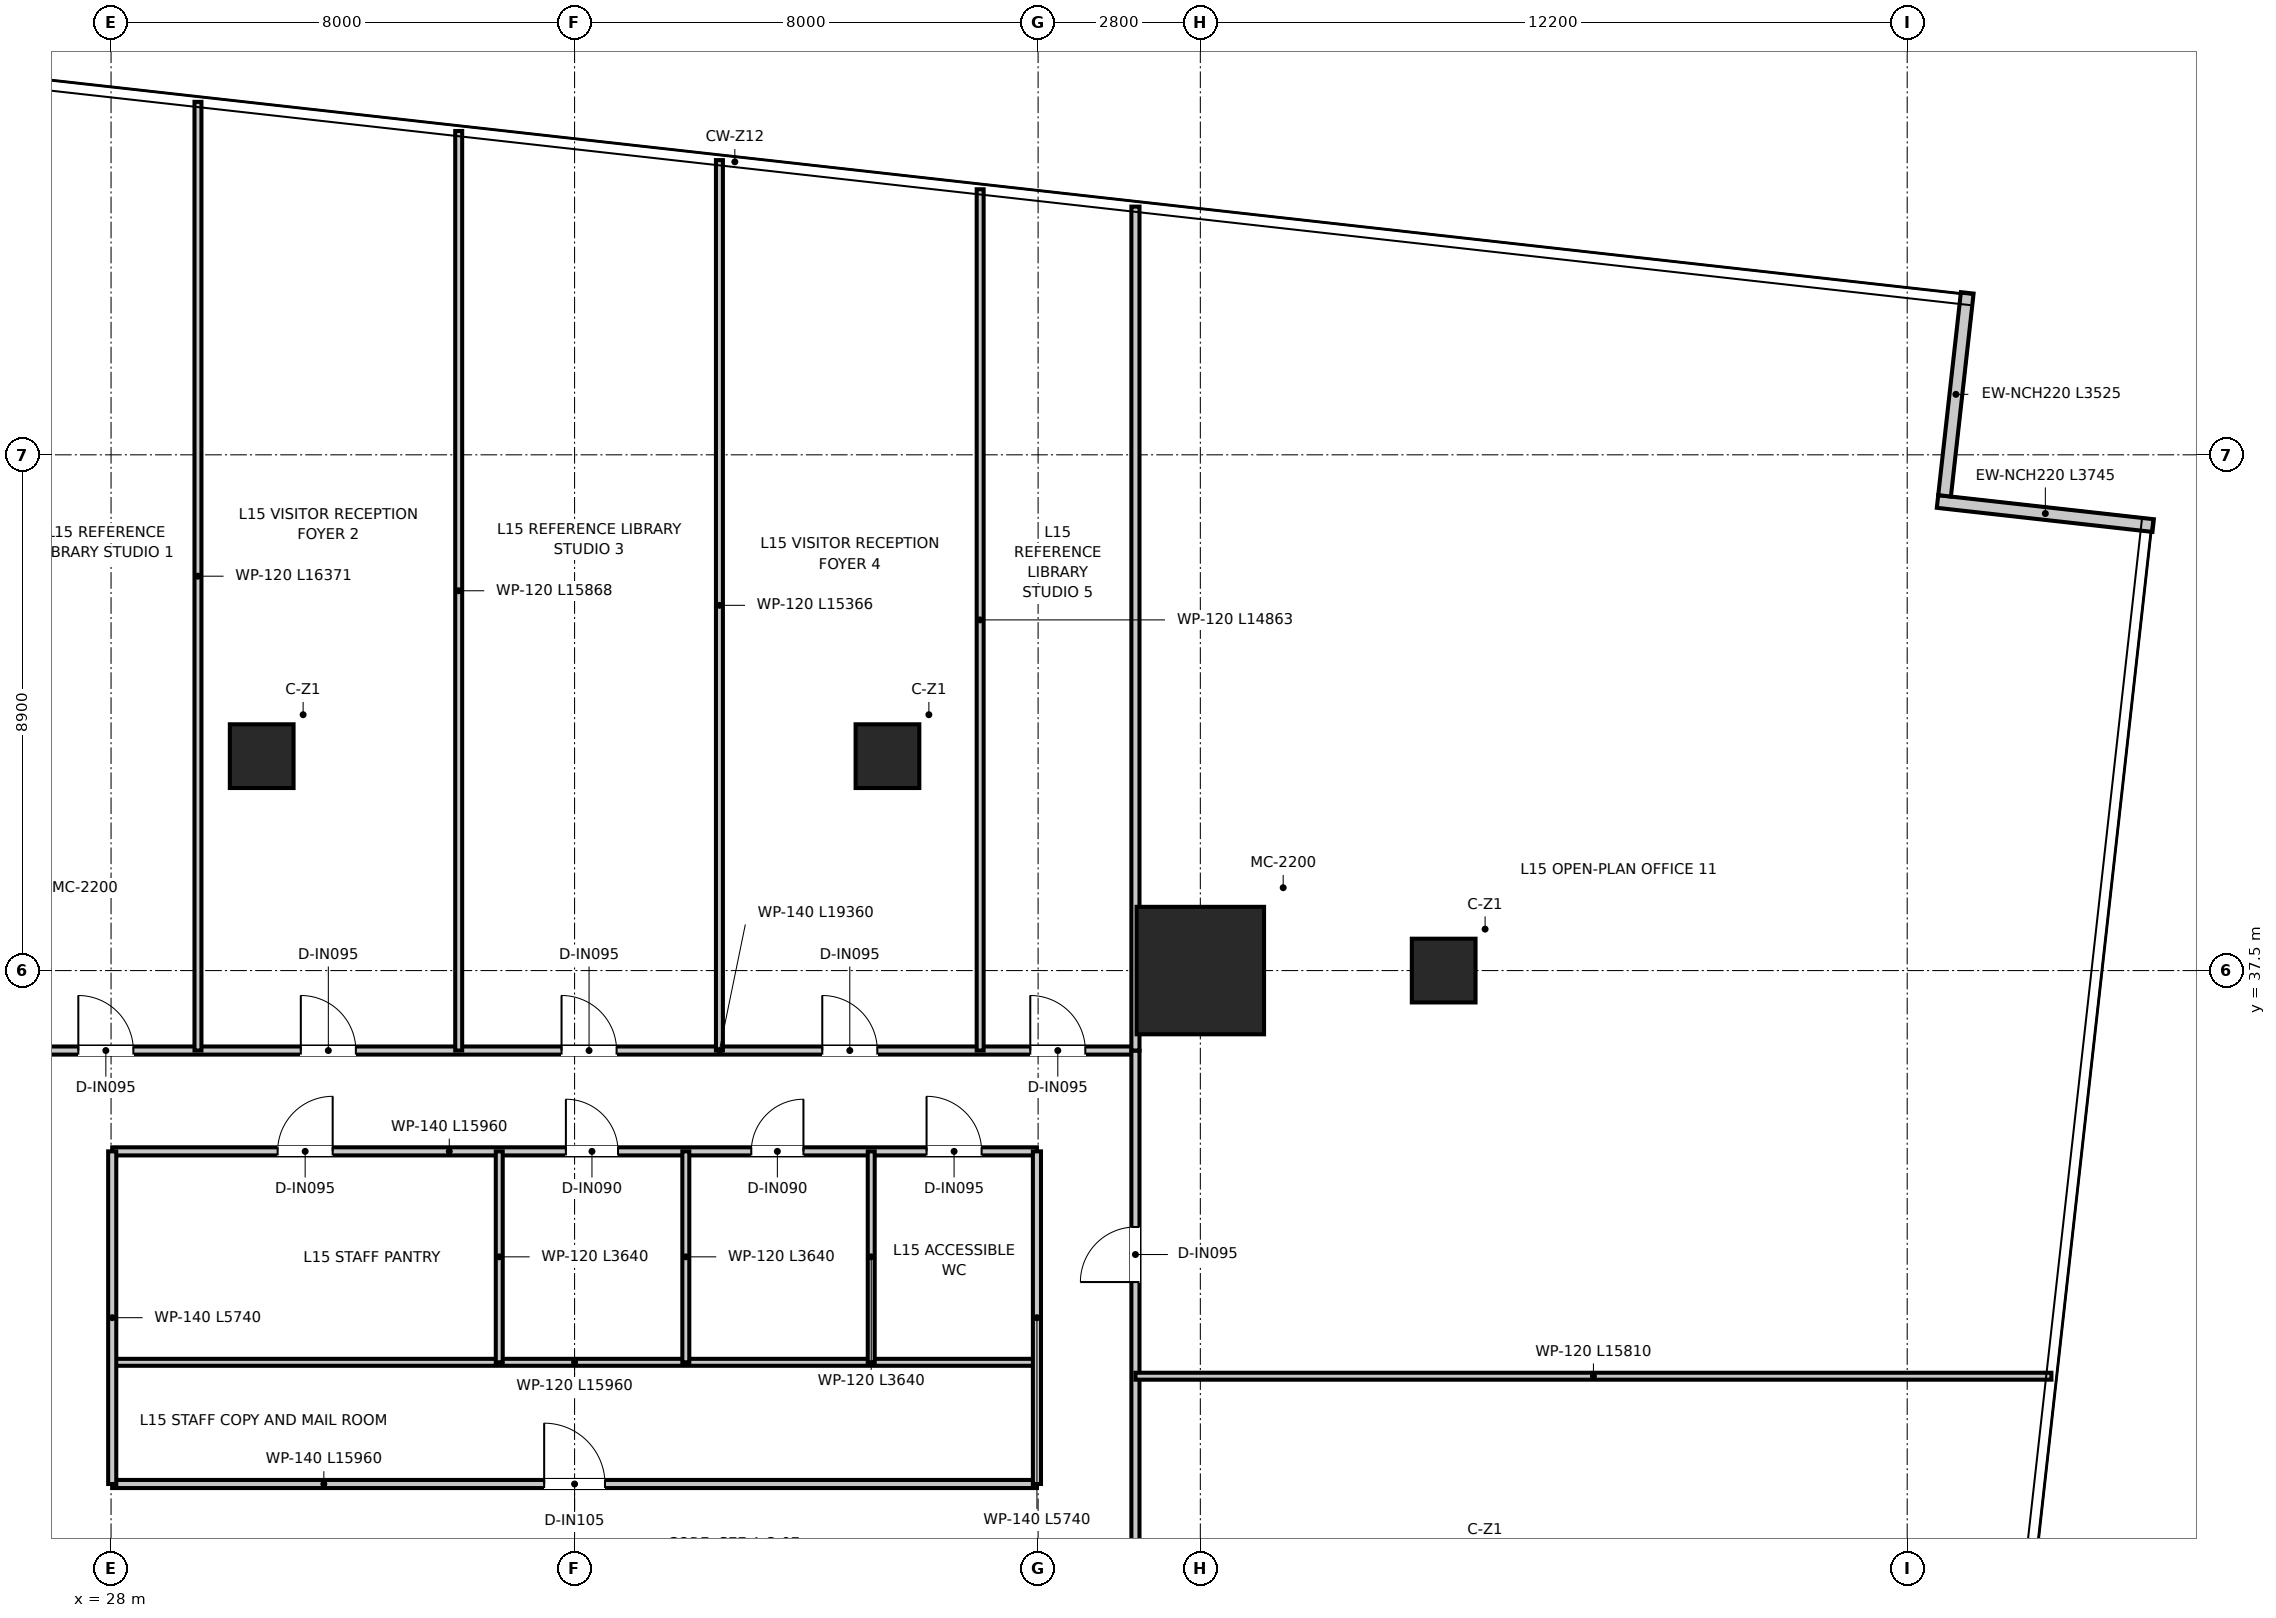
"""IFC4 building model, lengths in metres.
Left out: names, types, materials, properties, quantities, classifications, styles, units other than length and angle.
Written with IfcOpenShell. Run it as: python <this file> out.ifc"""

import sys

from ifc_helpers import new_model, si_unit, direction, frame, frame_2d, origin, origin_2d, place, context, subcontext, project, spatial, rectangle, extrude, source, transform, mapped, element, fill, save


model = new_model("IFC4")
c1 = context("Model", 3, precision=1e-05, world=origin(), true_north=direction((0.0, 1.0)))
c2 = subcontext(c1, "Body", "Model", "MODEL_VIEW")
j1 = project(units=[si_unit("LENGTHUNIT", "METRE"), si_unit("PLANEANGLEUNIT", "RADIAN")], contexts=[c1])
p1 = place(None, origin())
s1 = spatial("IfcSite", under=j1, at=p1, CompositionType="ELEMENT")
p2 = place(p1, origin())
s2 = spatial("IfcBuilding", under=s1, at=p2, CompositionType="ELEMENT")
p3 = place(p2, frame((0.0, 0.0, 64.5)))
s3 = spatial("IfcBuildingStorey", under=s2, at=p3, CompositionType="ELEMENT", Elevation=64.5)
m1 = source(origin(), c2, "Body", "SweptSolid", [
    extrude(rectangle(XDim=2.2, YDim=2.2, at=origin_2d()), origin(), (0.0, 0.0, 1.0), 3.95),
])
p4 = place(p3, frame((46.8, 37.5, 0.0), z_axis=(0.0, 0.0, 1.0), x_axis=(1.0, 0.0, 0.0)))
e1 = element("IfcColumn", 1, at=p4, inside=s3, PredefinedType="USERDEFINED", context=c2, shape_type="MappedRepresentation", body=[
    mapped(m1, transform((0.0, 0.0, 0.0), x_axis=(1.0, 0.0, 0.0), y_axis=(0.0, 1.0, 0.0), z_axis=(0.0, 0.0, 1.0), scale=1.0)),
])
m2 = source(origin(), c2, "Body", "SweptSolid", [
    extrude(rectangle(XDim=1.1, YDim=1.1, at=origin_2d()), origin(), (0.0, 0.0, 1.0), 3.95),
])
for number, where, z_axis, x_axis in (
    (2, (30.6, 41.2, 0.0), (0.0, 0.0, 1.0), (1.0, 0.0, 0.0)),
    (3, (41.4, 41.2, 0.0), (0.0, 0.0, 1.0), (1.0, 0.0, 0.0)),
    (4, (51.0, 37.5, 0.0), (0.0, 0.0, 1.0), (1.0, 0.0, 0.0)),
):
    element("IfcColumn", number, at=place(p3, frame(where, z_axis=z_axis, x_axis=x_axis)), inside=s3, PredefinedType="COLUMN", context=c2, shape_type="MappedRepresentation", body=[
        mapped(m2, transform((0.0, 0.0, 0.0), x_axis=(1.0, 0.0, 0.0), y_axis=(0.0, 1.0, 0.0), z_axis=(0.0, 0.0, 1.0), scale=1.0)),
    ])
p5 = place(p3, frame((63.245, 45.179, 0.0), z_axis=(0.0, 0.0, 1.0), x_axis=(-0.99381117716, 0.111082600583, 0.0)))
e5 = element("IfcWall", 5, at=p5, inside=s3, PredefinedType="ELEMENTEDWALL", context=c2, shape_type="SweptSolid", body=[
    extrude(rectangle(XDim=3.745, YDim=0.22, at=frame_2d((1.873, 0.0))), origin(), (0.0, 0.0, 1.0), 3.67),
])
p6 = place(p3, frame((59.645, 45.692, 0.0), z_axis=(0.0, 0.0, 1.0), x_axis=(0.111016801598, 0.993818529593, 0.0)))
e6 = element("IfcWall", 6, at=p6, inside=s3, PredefinedType="ELEMENTEDWALL", context=c2, shape_type="SweptSolid", body=[
    extrude(rectangle(XDim=3.525, YDim=0.22, at=frame_2d((1.763, 0.0))), origin(), (0.0, 0.0, 1.0), 3.67),
])
p7 = place(p3, frame((28.02, 28.64, 0.0), z_axis=(0.0, 0.0, 1.0), x_axis=(1.0, 0.0, 0.0)))
e7 = element("IfcWall", 7, at=p7, inside=s3, PredefinedType="PARTITIONING", context=c2, shape_type="SweptSolid", body=[
    extrude(rectangle(XDim=15.96, YDim=0.14, at=frame_2d((7.98, 0.0))), origin(), (0.0, 0.0, 1.0), 3.08),
])
p8 = place(p7, frame((7.455, 0.0, 0.0)))
e8 = element("IfcOpeningElement", 8, at=p8, cuts=e7, PredefinedType="OPENING", context=c2, shape_type="SweptSolid", body=[
    extrude(rectangle(XDim=1.05, YDim=2.15, at=frame_2d((0.525, 1.075))), frame((0.0, 0.08, 0.0), z_axis=(0.0, -1.0, 0.0), x_axis=(1.0, 0.0, 0.0)), (0.0, 0.0, 1.0), 0.16),
])
p9 = place(p3, frame((28.02, 30.74, 0.0), z_axis=(0.0, 0.0, 1.0), x_axis=(1.0, 0.0, 0.0)))
e9 = element("IfcWall", 9, at=p9, inside=s3, PredefinedType="PARTITIONING", context=c2, shape_type="SweptSolid", body=[
    extrude(rectangle(XDim=15.96, YDim=0.12, at=frame_2d((7.98, 0.0))), origin(), (0.0, 0.0, 1.0), 3.08),
])
p10 = place(p3, frame((28.02, 34.38, 0.0), z_axis=(0.0, 0.0, 1.0), x_axis=(1.0, 0.0, 0.0)))
e10 = element("IfcWall", 10, at=p10, inside=s3, PredefinedType="PARTITIONING", context=c2, shape_type="SweptSolid", body=[
    extrude(rectangle(XDim=15.96, YDim=0.14, at=frame_2d((7.98, 0.0))), origin(), (0.0, 0.0, 1.0), 3.08),
])
p11 = place(p10, frame((7.83, 0.0, 0.0)))
e11 = element("IfcOpeningElement", 11, at=p11, cuts=e10, PredefinedType="OPENING", context=c2, shape_type="SweptSolid", body=[
    extrude(rectangle(XDim=0.9, YDim=2.1, at=frame_2d((0.45, 1.05))), frame((0.0, 0.08, 0.0), z_axis=(0.0, -1.0, 0.0), x_axis=(1.0, 0.0, 0.0)), (0.0, 0.0, 1.0), 0.16),
])
p12 = place(p10, frame((11.03, 0.0, 0.0)))
e12 = element("IfcOpeningElement", 12, at=p12, cuts=e10, PredefinedType="OPENING", context=c2, shape_type="SweptSolid", body=[
    extrude(rectangle(XDim=0.9, YDim=2.1, at=frame_2d((0.45, 1.05))), frame((0.0, 0.08, 0.0), z_axis=(0.0, -1.0, 0.0), x_axis=(1.0, 0.0, 0.0)), (0.0, 0.0, 1.0), 0.16),
])
p13 = place(p10, frame((14.055, 0.0, 0.0)))
e13 = element("IfcOpeningElement", 13, at=p13, cuts=e10, PredefinedType="OPENING", context=c2, shape_type="SweptSolid", body=[
    extrude(rectangle(XDim=0.95, YDim=2.1, at=frame_2d((0.475, 1.05))), frame((0.0, 0.08, 0.0), z_axis=(0.0, -1.0, 0.0), x_axis=(1.0, 0.0, 0.0)), (0.0, 0.0, 1.0), 0.16),
])
p14 = place(p10, frame((2.855, 0.0, 0.0)))
e14 = element("IfcOpeningElement", 14, at=p14, cuts=e10, PredefinedType="OPENING", context=c2, shape_type="SweptSolid", body=[
    extrude(rectangle(XDim=0.95, YDim=2.1, at=frame_2d((0.475, 1.05))), frame((0.0, 0.08, 0.0), z_axis=(0.0, -1.0, 0.0), x_axis=(1.0, 0.0, 0.0)), (0.0, 0.0, 1.0), 0.16),
])
for number, where, z_axis, x_axis in (
    (15, (28.02, 28.64, 0.0), (0.0, 0.0, 1.0), (0.0, 1.0, 0.0)),
    (16, (43.98, 28.64, 0.0), (0.0, 0.0, 1.0), (0.0, 1.0, 0.0)),
):
    element("IfcWall", number, at=place(p3, frame(where, z_axis=z_axis, x_axis=x_axis)), inside=s3, PredefinedType="PARTITIONING", context=c2, shape_type="SweptSolid", body=[
        extrude(rectangle(XDim=5.74, YDim=0.14, at=frame_2d((2.87, 0.0))), origin(), (0.0, 0.0, 1.0), 3.22),
    ])
for number, where, z_axis, x_axis in (
    (17, (37.92, 30.74, 0.0), (0.0, 0.0, 1.0), (0.0, 1.0, 0.0)),
    (18, (41.12, 30.74, 0.0), (0.0, 0.0, 1.0), (0.0, 1.0, 0.0)),
    (19, (34.7, 30.74, 0.0), (0.0, 0.0, 1.0), (0.0, 1.0, 0.0)),
):
    element("IfcWall", number, at=place(p3, frame(where, z_axis=z_axis, x_axis=x_axis)), inside=s3, PredefinedType="PARTITIONING", context=c2, shape_type="SweptSolid", body=[
        extrude(rectangle(XDim=3.64, YDim=0.12, at=frame_2d((1.82, 0.0))), origin(), (0.0, 0.0, 1.0), 3.12),
    ])
p15 = place(p3, frame((26.32, 36.12, 0.0), z_axis=(0.0, 0.0, 1.0), x_axis=(1.0, 0.0, 0.0)))
e20 = element("IfcWall", 20, at=p15, inside=s3, PredefinedType="PARTITIONING", context=c2, shape_type="SweptSolid", body=[
    extrude(rectangle(XDim=19.36, YDim=0.14, at=frame_2d((9.68, 0.0))), origin(), (0.0, 0.0, 1.0), 3.08),
])
p16 = place(p15, frame((1.115, 0.0, 0.0)))
e21 = element("IfcOpeningElement", 21, at=p16, cuts=e20, PredefinedType="OPENING", context=c2, shape_type="SweptSolid", body=[
    extrude(rectangle(XDim=0.95, YDim=2.1, at=frame_2d((0.475, 1.05))), frame((0.0, 0.08, 0.0), z_axis=(0.0, -1.0, 0.0), x_axis=(1.0, 0.0, 0.0)), (0.0, 0.0, 1.0), 0.16),
])
p17 = place(p15, frame((4.955, 0.0, 0.0)))
e22 = element("IfcOpeningElement", 22, at=p17, cuts=e20, PredefinedType="OPENING", context=c2, shape_type="SweptSolid", body=[
    extrude(rectangle(XDim=0.95, YDim=2.1, at=frame_2d((0.475, 1.05))), frame((0.0, 0.08, 0.0), z_axis=(0.0, -1.0, 0.0), x_axis=(1.0, 0.0, 0.0)), (0.0, 0.0, 1.0), 0.16),
])
p18 = place(p15, frame((9.455, 0.0, 0.0)))
e23 = element("IfcOpeningElement", 23, at=p18, cuts=e20, PredefinedType="OPENING", context=c2, shape_type="SweptSolid", body=[
    extrude(rectangle(XDim=0.95, YDim=2.1, at=frame_2d((0.475, 1.05))), frame((0.0, 0.08, 0.0), z_axis=(0.0, -1.0, 0.0), x_axis=(1.0, 0.0, 0.0)), (0.0, 0.0, 1.0), 0.16),
])
p19 = place(p15, frame((13.955, 0.0, 0.0)))
e24 = element("IfcOpeningElement", 24, at=p19, cuts=e20, PredefinedType="OPENING", context=c2, shape_type="SweptSolid", body=[
    extrude(rectangle(XDim=0.95, YDim=2.1, at=frame_2d((0.475, 1.05))), frame((0.0, 0.08, 0.0), z_axis=(0.0, -1.0, 0.0), x_axis=(1.0, 0.0, 0.0)), (0.0, 0.0, 1.0), 0.16),
])
p20 = place(p15, frame((17.545, 0.0, 0.0)))
e25 = element("IfcOpeningElement", 25, at=p20, cuts=e20, PredefinedType="OPENING", context=c2, shape_type="SweptSolid", body=[
    extrude(rectangle(XDim=0.95, YDim=2.1, at=frame_2d((0.475, 1.05))), frame((0.0, 0.08, 0.0), z_axis=(0.0, -1.0, 0.0), x_axis=(1.0, 0.0, 0.0)), (0.0, 0.0, 1.0), 0.16),
])
p21 = place(p3, frame((45.68, 10.5, 0.0), z_axis=(0.0, 0.0, 1.0), x_axis=(0.0, 1.0, 0.0)))
e26 = element("IfcWall", 26, at=p21, inside=s3, PredefinedType="PARTITIONING", context=c2, shape_type="SweptSolid", body=[
    extrude(rectangle(XDim=25.62, YDim=0.14, at=frame_2d((12.81, 0.0))), origin(), (0.0, 0.0, 1.0), 2.97),
])
p22 = place(p21, frame((9.025, 0.0, 0.0)))
e27 = element("IfcOpeningElement", 27, at=p22, cuts=e26, PredefinedType="OPENING", context=c2, shape_type="SweptSolid", body=[
    extrude(rectangle(XDim=0.95, YDim=2.1, at=frame_2d((0.475, 1.05))), frame((0.0, 0.08, 0.0), z_axis=(0.0, -1.0, 0.0), x_axis=(1.0, 0.0, 0.0)), (0.0, 0.0, 1.0), 0.16),
])
p23 = place(p21, frame((15.525, 0.0, 0.0)))
e28 = element("IfcOpeningElement", 28, at=p23, cuts=e26, PredefinedType="OPENING", context=c2, shape_type="SweptSolid", body=[
    extrude(rectangle(XDim=0.95, YDim=2.1, at=frame_2d((0.475, 1.05))), frame((0.0, 0.08, 0.0), z_axis=(0.0, -1.0, 0.0), x_axis=(1.0, 0.0, 0.0)), (0.0, 0.0, 1.0), 0.16),
])
p24 = place(p21, frame((21.625, 0.0, 0.0)))
e29 = element("IfcOpeningElement", 29, at=p24, cuts=e26, PredefinedType="OPENING", context=c2, shape_type="SweptSolid", body=[
    extrude(rectangle(XDim=0.95, YDim=2.1, at=frame_2d((0.475, 1.05))), frame((0.0, 0.08, 0.0), z_axis=(0.0, -1.0, 0.0), x_axis=(1.0, 0.0, 0.0)), (0.0, 0.0, 1.0), 0.16),
])
p25 = place(p3, frame((45.68, 36.12, 0.0), z_axis=(0.0, 0.0, 1.0), x_axis=(0.0, 1.0, 0.0)))
e30 = element("IfcWall", 30, at=p25, inside=s3, PredefinedType="PARTITIONING", context=c2, shape_type="SweptSolid", body=[
    extrude(rectangle(XDim=14.563, YDim=0.14, at=frame_2d((7.282, 0.0))), origin(), (0.0, 0.0, 1.0), 2.97),
])
p26 = place(p3, frame((29.5, 36.12, 0.0), z_axis=(0.0, 0.0, 1.0), x_axis=(0.0, 1.0, 0.0)))
e31 = element("IfcWall", 31, at=p26, inside=s3, PredefinedType="PARTITIONING", context=c2, shape_type="SweptSolid", body=[
    extrude(rectangle(XDim=16.371, YDim=0.12, at=frame_2d((8.186, 0.0))), origin(), (0.0, 0.0, 1.0), 2.97),
])
p27 = place(p3, frame((34.0, 36.12, 0.0), z_axis=(0.0, 0.0, 1.0), x_axis=(0.0, 1.0, 0.0)))
e32 = element("IfcWall", 32, at=p27, inside=s3, PredefinedType="PARTITIONING", context=c2, shape_type="SweptSolid", body=[
    extrude(rectangle(XDim=15.868, YDim=0.12, at=frame_2d((7.934, 0.0))), origin(), (0.0, 0.0, 1.0), 2.97),
])
p28 = place(p3, frame((38.5, 36.12, 0.0), z_axis=(0.0, 0.0, 1.0), x_axis=(0.0, 1.0, 0.0)))
e33 = element("IfcWall", 33, at=p28, inside=s3, PredefinedType="PARTITIONING", context=c2, shape_type="SweptSolid", body=[
    extrude(rectangle(XDim=15.365, YDim=0.12, at=frame_2d((7.683, 0.0))), origin(), (0.0, 0.0, 1.0), 2.97),
])
p29 = place(p3, frame((43.0, 36.12, 0.0), z_axis=(0.0, 0.0, 1.0), x_axis=(0.0, 1.0, 0.0)))
e34 = element("IfcWall", 34, at=p29, inside=s3, PredefinedType="PARTITIONING", context=c2, shape_type="SweptSolid", body=[
    extrude(rectangle(XDim=14.863, YDim=0.12, at=frame_2d((7.431, 0.0))), origin(), (0.0, 0.0, 1.0), 2.97),
])
p30 = place(p3, frame((45.68, 30.5, 0.0), z_axis=(0.0, 0.0, 1.0), x_axis=(1.0, 0.0, 0.0)))
e35 = element("IfcWall", 35, at=p30, inside=s3, PredefinedType="PARTITIONING", context=c2, shape_type="SweptSolid", body=[
    extrude(rectangle(XDim=15.81, YDim=0.12, at=frame_2d((7.905, 0.0))), origin(), (0.0, 0.0, 1.0), 2.97),
])
p31 = place(p8, origin())
e36 = element("IfcDoor", 36, at=p31, inside=s3, OperationType="SINGLE_SWING_LEFT", PredefinedType="DOOR", context=c2, shape_type="SweptSolid", body=[
    extrude(rectangle(XDim=1.05, YDim=2.15, at=frame_2d((0.525, 1.075))), frame((0.0, 0.025, 0.0), z_axis=(0.0, -1.0, 0.0), x_axis=(1.0, 0.0, 0.0)), (0.0, 0.0, 1.0), 0.05),
])
fill(e8, e36)
p32 = place(p11, origin())
e37 = element("IfcDoor", 37, at=p32, inside=s3, OperationType="SINGLE_SWING_LEFT", PredefinedType="DOOR", context=c2, shape_type="SweptSolid", body=[
    extrude(rectangle(XDim=0.9, YDim=2.1, at=frame_2d((0.45, 1.05))), frame((0.0, 0.025, 0.0), z_axis=(0.0, -1.0, 0.0), x_axis=(1.0, 0.0, 0.0)), (0.0, 0.0, 1.0), 0.05),
])
fill(e11, e37)
p33 = place(p12, origin())
e38 = element("IfcDoor", 38, at=p33, inside=s3, OperationType="SINGLE_SWING_RIGHT", PredefinedType="DOOR", context=c2, shape_type="SweptSolid", body=[
    extrude(rectangle(XDim=0.9, YDim=2.1, at=frame_2d((0.45, 1.05))), frame((0.0, 0.025, 0.0), z_axis=(0.0, -1.0, 0.0), x_axis=(1.0, 0.0, 0.0)), (0.0, 0.0, 1.0), 0.05),
])
fill(e12, e38)
p34 = place(p13, origin())
e39 = element("IfcDoor", 39, at=p34, inside=s3, OperationType="SINGLE_SWING_LEFT", PredefinedType="DOOR", context=c2, shape_type="SweptSolid", body=[
    extrude(rectangle(XDim=0.95, YDim=2.1, at=frame_2d((0.475, 1.05))), frame((0.0, 0.025, 0.0), z_axis=(0.0, -1.0, 0.0), x_axis=(1.0, 0.0, 0.0)), (0.0, 0.0, 1.0), 0.05),
])
fill(e13, e39)
p35 = place(p14, origin())
e40 = element("IfcDoor", 40, at=p35, inside=s3, OperationType="SINGLE_SWING_RIGHT", PredefinedType="DOOR", context=c2, shape_type="SweptSolid", body=[
    extrude(rectangle(XDim=0.95, YDim=2.1, at=frame_2d((0.475, 1.05))), frame((0.0, 0.025, 0.0), z_axis=(0.0, -1.0, 0.0), x_axis=(1.0, 0.0, 0.0)), (0.0, 0.0, 1.0), 0.05),
])
fill(e14, e40)
p36 = place(p16, origin())
e41 = element("IfcDoor", 41, at=p36, inside=s3, OperationType="SINGLE_SWING_LEFT", PredefinedType="DOOR", context=c2, shape_type="SweptSolid", body=[
    extrude(rectangle(XDim=0.95, YDim=2.1, at=frame_2d((0.475, 1.05))), frame((0.0, 0.025, 0.0), z_axis=(0.0, -1.0, 0.0), x_axis=(1.0, 0.0, 0.0)), (0.0, 0.0, 1.0), 0.05),
])
fill(e21, e41)
p37 = place(p17, origin())
e42 = element("IfcDoor", 42, at=p37, inside=s3, OperationType="SINGLE_SWING_LEFT", PredefinedType="DOOR", context=c2, shape_type="SweptSolid", body=[
    extrude(rectangle(XDim=0.95, YDim=2.1, at=frame_2d((0.475, 1.05))), frame((0.0, 0.025, 0.0), z_axis=(0.0, -1.0, 0.0), x_axis=(1.0, 0.0, 0.0)), (0.0, 0.0, 1.0), 0.05),
])
fill(e22, e42)
p38 = place(p18, origin())
e43 = element("IfcDoor", 43, at=p38, inside=s3, OperationType="SINGLE_SWING_LEFT", PredefinedType="DOOR", context=c2, shape_type="SweptSolid", body=[
    extrude(rectangle(XDim=0.95, YDim=2.1, at=frame_2d((0.475, 1.05))), frame((0.0, 0.025, 0.0), z_axis=(0.0, -1.0, 0.0), x_axis=(1.0, 0.0, 0.0)), (0.0, 0.0, 1.0), 0.05),
])
fill(e23, e43)
p39 = place(p19, origin())
e44 = element("IfcDoor", 44, at=p39, inside=s3, OperationType="SINGLE_SWING_LEFT", PredefinedType="DOOR", context=c2, shape_type="SweptSolid", body=[
    extrude(rectangle(XDim=0.95, YDim=2.1, at=frame_2d((0.475, 1.05))), frame((0.0, 0.025, 0.0), z_axis=(0.0, -1.0, 0.0), x_axis=(1.0, 0.0, 0.0)), (0.0, 0.0, 1.0), 0.05),
])
fill(e24, e44)
p40 = place(p20, origin())
e45 = element("IfcDoor", 45, at=p40, inside=s3, OperationType="SINGLE_SWING_LEFT", PredefinedType="DOOR", context=c2, shape_type="SweptSolid", body=[
    extrude(rectangle(XDim=0.95, YDim=2.1, at=frame_2d((0.475, 1.05))), frame((0.0, 0.025, 0.0), z_axis=(0.0, -1.0, 0.0), x_axis=(1.0, 0.0, 0.0)), (0.0, 0.0, 1.0), 0.05),
])
fill(e25, e45)
p41 = place(p24, origin())
e46 = element("IfcDoor", 46, at=p41, inside=s3, OperationType="SINGLE_SWING_LEFT", PredefinedType="DOOR", context=c2, shape_type="SweptSolid", body=[
    extrude(rectangle(XDim=0.95, YDim=2.1, at=frame_2d((0.475, 1.05))), frame((0.0, 0.025, 0.0), z_axis=(0.0, -1.0, 0.0), x_axis=(1.0, 0.0, 0.0)), (0.0, 0.0, 1.0), 0.05),
])
fill(e29, e46)
save(model, sys.argv[1])
